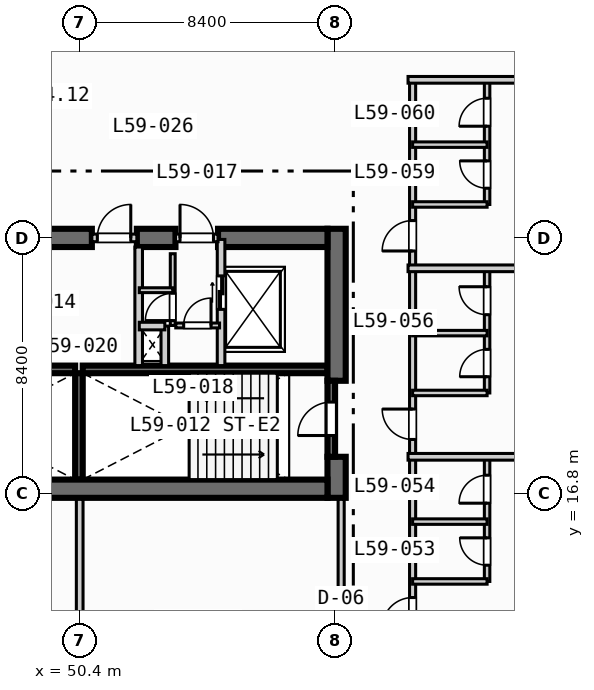
"""IFC4 building model, lengths in metres.
Left out: names, types, materials, properties, quantities, classifications, styles, units other than length and angle.
Written with IfcOpenShell. Run it as: python <this file> out.ifc"""

import sys

from ifc_helpers import new_model, si_unit, direction, frame, frame_2d, origin, place, context, subcontext, project, spatial, rectangle, extrude, element, fill, save


model = new_model("IFC4")
c1 = context("Model", 3, precision=1e-05, world=origin(), true_north=direction((0.0, 1.0)))
c2 = subcontext(c1, "Body", "Model", "MODEL_VIEW")
j1 = project(units=[si_unit("LENGTHUNIT", "METRE"), si_unit("PLANEANGLEUNIT", "RADIAN")], contexts=[c1])
p1 = place(None, origin())
s1 = spatial("IfcSite", under=j1, at=p1, CompositionType="ELEMENT")
p2 = place(p1, origin())
s2 = spatial("IfcBuilding", under=s1, at=p2, CompositionType="ELEMENT")
p3 = place(p2, frame((0.0, 0.0, 241.6)))
s3 = spatial("IfcBuildingStorey", under=s2, at=p3, CompositionType="ELEMENT", Elevation=241.6)
for number, where, z_axis, x_axis in (
    (1, (42.2, 20.875, 0.0), (0.0, 0.0, 1.0), (1.0, 0.0, 0.0)),
    (2, (50.5, 20.875, 0.0), (0.0, 0.0, 1.0), (1.0, 0.0, 0.0)),
):
    element("IfcWall", number, at=place(p3, frame(where, z_axis=z_axis, x_axis=x_axis)), inside=s3, PredefinedType="SOLIDWALL", context=c2, shape_type="SweptSolid", body=[
        extrude(rectangle(XDim=8.05, YDim=0.25, at=frame_2d((4.025, 0.0))), origin(), (0.0, 0.0, 1.0), 3.47),
    ])
p4 = place(p3, frame((50.375, 17.25, 0.0), z_axis=(0.0, 0.0, 1.0), x_axis=(0.0, 1.0, 0.0)))
e3 = element("IfcWall", 3, at=p4, inside=s3, PredefinedType="SOLIDWALL", context=c2, shape_type="SweptSolid", body=[
    extrude(rectangle(XDim=3.5, YDim=0.25, at=frame_2d((1.75, 0.0))), origin(), (0.0, 0.0, 1.0), 3.47),
])
p5 = place(p3, frame((58.85, 16.65, 0.0), z_axis=(0.0, 0.0, 1.0), x_axis=(0.0, 1.0, 0.0)))
e4 = element("IfcWall", 4, at=p5, inside=s3, PredefinedType="SHEAR", context=c2, shape_type="SweptSolid", body=[
    extrude(rectangle(XDim=1.35, YDim=0.6, at=frame_2d((0.675, 0.0))), origin(), (0.0, 0.0, 1.0), 3.47),
])
p6 = place(p3, frame((58.85, 20.5, 0.0), z_axis=(0.0, 0.0, 1.0), x_axis=(0.0, 1.0, 0.0)))
e5 = element("IfcWall", 5, at=p6, inside=s3, PredefinedType="SHEAR", context=c2, shape_type="SweptSolid", body=[
    extrude(rectangle(XDim=5.0, YDim=0.6, at=frame_2d((2.5, 0.0))), origin(), (0.0, 0.0, 1.0), 3.47),
])
p7 = place(p3, frame((42.2, 16.95, 0.0), z_axis=(0.0, 0.0, 1.0), x_axis=(1.0, 0.0, 0.0)))
e6 = element("IfcWall", 6, at=p7, inside=s3, PredefinedType="SHEAR", context=c2, shape_type="SweptSolid", body=[
    extrude(rectangle(XDim=16.35, YDim=0.6, at=frame_2d((8.175, 0.0))), origin(), (0.0, 0.0, 1.0), 3.47),
])
p8 = place(p3, frame((42.2, 25.2, 0.0), z_axis=(0.0, 0.0, 1.0), x_axis=(1.0, 0.0, 0.0)))
e7 = element("IfcWall", 7, at=p8, inside=s3, PredefinedType="SHEAR", context=c2, shape_type="SweptSolid", body=[
    extrude(rectangle(XDim=8.6, YDim=0.6, at=frame_2d((4.3, 0.0))), origin(), (0.0, 0.0, 1.0), 3.47),
])
p9 = place(p3, frame((52.28, 25.2, 0.0), z_axis=(0.0, 0.0, 1.0), x_axis=(1.0, 0.0, 0.0)))
e8 = element("IfcWall", 8, at=p9, inside=s3, PredefinedType="SHEAR", context=c2, shape_type="SweptSolid", body=[
    extrude(rectangle(XDim=1.27, YDim=0.6, at=frame_2d((0.635, 0.0))), origin(), (0.0, 0.0, 1.0), 3.47),
])
p10 = place(p3, frame((54.95, 25.2, 0.0), z_axis=(0.0, 0.0, 1.0), x_axis=(1.0, 0.0, 0.0)))
e9 = element("IfcWall", 9, at=p10, inside=s3, PredefinedType="SHEAR", context=c2, shape_type="SweptSolid", body=[
    extrude(rectangle(XDim=3.6, YDim=0.6, at=frame_2d((1.8, 0.0))), origin(), (0.0, 0.0, 1.0), 3.47),
])
p11 = place(p3, frame((58.675, 18.0, 0.0), z_axis=(0.0, 0.0, 1.0), x_axis=(0.0, 1.0, 0.0)))
e10 = element("IfcWall", 10, at=p11, inside=s3, PredefinedType="SOLIDWALL", context=c2, shape_type="SweptSolid", body=[
    extrude(rectangle(XDim=2.5, YDim=0.25, at=frame_2d((1.25, 0.0))), origin(), (0.0, 0.0, 1.0), 3.47),
])
p12 = place(p11, frame((0.7, 0.0, 0.0)))
e11 = element("IfcOpeningElement", 11, at=p12, cuts=e10, PredefinedType="OPENING", context=c2, shape_type="SweptSolid", body=[
    extrude(rectangle(XDim=1.1, YDim=2.15, at=frame_2d((0.55, 1.075))), frame((0.0, 0.135, 0.0), z_axis=(0.0, -1.0, 0.0), x_axis=(1.0, 0.0, 0.0)), (0.0, 0.0, 1.0), 0.27),
])
p13 = place(p3, frame((50.8, 25.2, 0.0), z_axis=(0.0, 0.0, 1.0), x_axis=(1.0, 0.0, 0.0)))
e12 = element("IfcWall", 12, at=p13, inside=s3, PredefinedType="SOLIDWALL", context=c2, shape_type="SweptSolid", body=[
    extrude(rectangle(XDim=1.48, YDim=0.25, at=frame_2d((0.74, 0.0))), origin(), (0.0, 0.0, 1.0), 3.47),
])
p14 = place(p13, frame((0.18, 0.0, 0.0)))
e13 = element("IfcOpeningElement", 13, at=p14, cuts=e12, PredefinedType="OPENING", context=c2, shape_type="SweptSolid", body=[
    extrude(rectangle(XDim=1.1, YDim=2.15, at=frame_2d((0.55, 1.075))), frame((0.0, 0.135, 0.0), z_axis=(0.0, -1.0, 0.0), x_axis=(1.0, 0.0, 0.0)), (0.0, 0.0, 1.0), 0.27),
])
p15 = place(p3, frame((52.34, 21.0, 0.0), z_axis=(0.0, 0.0, 1.0), x_axis=(0.0, 1.0, 0.0)))
e14 = element("IfcWall", 14, at=p15, inside=s3, PredefinedType="SOLIDWALL", context=c2, shape_type="SweptSolid", body=[
    extrude(rectangle(XDim=3.9, YDim=0.25, at=frame_2d((1.95, 0.0))), origin(), (0.0, 0.0, 1.0), 3.47),
])
p16 = place(p3, frame((55.05, 21.0, 0.0), z_axis=(0.0, 0.0, 1.0), x_axis=(0.0, 1.0, 0.0)))
e15 = element("IfcWall", 15, at=p16, inside=s3, PredefinedType="SOLIDWALL", context=c2, shape_type="SweptSolid", body=[
    extrude(rectangle(XDim=4.15, YDim=0.25, at=frame_2d((2.075, 0.0))), origin(), (0.0, 0.0, 1.0), 3.47),
])
p17 = place(p16, frame((1.85, 0.0, 0.0)))
e16 = element("IfcOpeningElement", 16, at=p17, cuts=e15, PredefinedType="OPENING", context=c2, shape_type="SweptSolid", body=[
    extrude(rectangle(XDim=1.1, YDim=2.15, at=frame_2d((0.55, 1.075))), frame((0.0, 0.135, 0.0), z_axis=(0.0, -1.0, 0.0), x_axis=(1.0, 0.0, 0.0)), (0.0, 0.0, 1.0), 0.27),
])
p18 = place(p3, frame((53.55, 25.2, 0.0), z_axis=(0.0, 0.0, 1.0), x_axis=(1.0, 0.0, 0.0)))
e17 = element("IfcWall", 17, at=p18, inside=s3, PredefinedType="SOLIDWALL", context=c2, shape_type="SweptSolid", body=[
    extrude(rectangle(XDim=1.4, YDim=0.25, at=frame_2d((0.7, 0.0))), origin(), (0.0, 0.0, 1.0), 3.47),
])
p19 = place(p18, frame((0.15, 0.0, 0.0)))
e18 = element("IfcOpeningElement", 18, at=p19, cuts=e17, PredefinedType="OPENING", context=c2, shape_type="SweptSolid", body=[
    extrude(rectangle(XDim=1.1, YDim=2.15, at=frame_2d((0.55, 1.075))), frame((0.0, 0.135, 0.0), z_axis=(0.0, -1.0, 0.0), x_axis=(1.0, 0.0, 0.0)), (0.0, 0.0, 1.0), 0.27),
])
p20 = place(p3, frame((53.2, 21.0, 0.0), z_axis=(0.0, 0.0, 1.0), x_axis=(0.0, 1.0, 0.0)))
e19 = element("IfcWall", 19, at=p20, inside=s3, PredefinedType="SOLIDWALL", context=c2, shape_type="SweptSolid", body=[
    extrude(rectangle(XDim=1.3, YDim=0.25, at=frame_2d((0.65, 0.0))), origin(), (0.0, 0.0, 1.0), 3.47),
])
p21 = place(p3, frame((52.36, 22.3, 0.0), z_axis=(0.0, 0.0, 1.0), x_axis=(1.0, 0.0, 0.0)))
e20 = element("IfcWall", 20, at=p21, inside=s3, PredefinedType="SOLIDWALL", context=c2, shape_type="SweptSolid", body=[
    extrude(rectangle(XDim=0.84, YDim=0.25, at=frame_2d((0.42, 0.0))), origin(), (0.0, 0.0, 1.0), 3.47),
])
p22 = place(p3, frame((53.56, 22.32, 0.0), z_axis=(0.0, 0.0, 1.0), x_axis=(1.0, 0.0, 0.0)))
e21 = element("IfcWall", 21, at=p22, inside=s3, PredefinedType="PARTITIONING", context=c2, shape_type="SweptSolid", body=[
    extrude(rectangle(XDim=1.44, YDim=0.16, at=frame_2d((0.72, 0.0))), origin(), (0.0, 0.0, 1.0), 3.47),
])
p23 = place(p22, frame((0.26, 0.0, 0.0)))
e22 = element("IfcOpeningElement", 22, at=p23, cuts=e21, PredefinedType="OPENING", context=c2, shape_type="SweptSolid", body=[
    extrude(rectangle(XDim=0.9, YDim=2.1, at=frame_2d((0.45, 1.05))), frame((0.0, 0.09, 0.0), z_axis=(0.0, -1.0, 0.0), x_axis=(1.0, 0.0, 0.0)), (0.0, 0.0, 1.0), 0.18),
])
p24 = place(p3, frame((53.46, 22.32, 0.0), z_axis=(0.0, 0.0, 1.0), x_axis=(0.0, 1.0, 0.0)))
e23 = element("IfcWall", 23, at=p24, inside=s3, PredefinedType="PARTITIONING", context=c2, shape_type="SweptSolid", body=[
    extrude(rectangle(XDim=2.36, YDim=0.16, at=frame_2d((1.18, 0.0))), origin(), (0.0, 0.0, 1.0), 3.47),
])
p25 = place(p24, frame((0.16, 0.0, 0.0)))
e24 = element("IfcOpeningElement", 24, at=p25, cuts=e23, PredefinedType="OPENING", context=c2, shape_type="SweptSolid", body=[
    extrude(rectangle(XDim=0.9, YDim=2.1, at=frame_2d((0.45, 1.05))), frame((0.0, 0.09, 0.0), z_axis=(0.0, -1.0, 0.0), x_axis=(1.0, 0.0, 0.0)), (0.0, 0.0, 1.0), 0.18),
])
p26 = place(p3, frame((52.36, 23.48, 0.0), z_axis=(0.0, 0.0, 1.0), x_axis=(1.0, 0.0, 0.0)))
e25 = element("IfcWall", 25, at=p26, inside=s3, PredefinedType="PARTITIONING", context=c2, shape_type="SweptSolid", body=[
    extrude(rectangle(XDim=1.1, YDim=0.16, at=frame_2d((0.55, 0.0))), origin(), (0.0, 0.0, 1.0), 3.47),
])
p27 = place(p3, frame((59.0, 8.65, 0.0), z_axis=(0.0, 0.0, 1.0), x_axis=(0.0, 1.0, 0.0)))
e26 = element("IfcWall", 26, at=p27, inside=s3, PredefinedType="PARTITIONING", context=c2, shape_type="SweptSolid", body=[
    extrude(rectangle(XDim=7.95, YDim=0.2, at=frame_2d((3.975, 0.0))), origin(), (0.0, 0.0, 1.0), 2.82),
])
p28 = place(p27, frame((2.2, 0.0, 0.0)))
e27 = element("IfcOpeningElement", 27, at=p28, cuts=e26, PredefinedType="OPENING", context=c2, shape_type="SweptSolid", body=[
    extrude(rectangle(XDim=0.92, YDim=2.1, at=frame_2d((0.46, 1.05))), frame((0.0, 0.11, 0.0), z_axis=(0.0, -1.0, 0.0), x_axis=(1.0, 0.0, 0.0)), (0.0, 0.0, 1.0), 0.22),
])
p29 = place(p3, frame((50.4, 8.65, 0.0), z_axis=(0.0, 0.0, 1.0), x_axis=(0.0, 1.0, 0.0)))
e28 = element("IfcWall", 28, at=p29, inside=s3, PredefinedType="PARTITIONING", context=c2, shape_type="SweptSolid", body=[
    extrude(rectangle(XDim=7.95, YDim=0.22, at=frame_2d((3.975, 0.0))), origin(), (0.0, 0.0, 1.0), 2.853),
])
p30 = place(p3, frame((61.35, 11.8, 0.0), z_axis=(0.0, 0.0, 1.0), x_axis=(0.0, 1.0, 0.0)))
e29 = element("IfcWall", 29, at=p30, inside=s3, PredefinedType="PARTITIONING", context=c2, shape_type="SweptSolid", body=[
    extrude(rectangle(XDim=18.6, YDim=0.2, at=frame_2d((9.3, 0.0))), origin(), (0.0, 0.0, 1.0), 3.47),
])
p31 = place(p30, frame((0.57, 0.0, 0.0)))
e30 = element("IfcOpeningElement", 30, at=p31, cuts=e29, PredefinedType="OPENING", context=c2, shape_type="SweptSolid", body=[
    extrude(rectangle(XDim=1.0, YDim=2.15, at=frame_2d((0.5, 1.075))), frame((0.0, 0.11, 0.0), z_axis=(0.0, -1.0, 0.0), x_axis=(1.0, 0.0, 0.0)), (0.0, 0.0, 1.0), 0.22),
])
p32 = place(p30, frame((6.77, 0.0, 0.0)))
e31 = element("IfcOpeningElement", 31, at=p32, cuts=e29, PredefinedType="OPENING", context=c2, shape_type="SweptSolid", body=[
    extrude(rectangle(XDim=1.0, YDim=2.15, at=frame_2d((0.5, 1.075))), frame((0.0, 0.11, 0.0), z_axis=(0.0, -1.0, 0.0), x_axis=(1.0, 0.0, 0.0)), (0.0, 0.0, 1.0), 0.22),
])
p33 = place(p30, frame((12.97, 0.0, 0.0)))
e32 = element("IfcOpeningElement", 32, at=p33, cuts=e29, PredefinedType="OPENING", context=c2, shape_type="SweptSolid", body=[
    extrude(rectangle(XDim=1.0, YDim=2.15, at=frame_2d((0.5, 1.075))), frame((0.0, 0.11, 0.0), z_axis=(0.0, -1.0, 0.0), x_axis=(1.0, 0.0, 0.0)), (0.0, 0.0, 1.0), 0.22),
])
p34 = place(p3, frame((63.8, 13.9, 0.0), z_axis=(0.0, 0.0, 1.0), x_axis=(0.0, 1.0, 0.0)))
e33 = element("IfcWall", 33, at=p34, inside=s3, PredefinedType="PLUMBINGWALL", context=c2, shape_type="SweptSolid", body=[
    extrude(rectangle(XDim=4.1, YDim=0.18, at=frame_2d((2.05, 0.0))), origin(), (0.0, 0.0, 1.0), 3.47),
])
p35 = place(p34, frame((0.534, 0.0, 0.0)))
e34 = element("IfcOpeningElement", 34, at=p35, cuts=e33, PredefinedType="OPENING", context=c2, shape_type="SweptSolid", body=[
    extrude(rectangle(XDim=0.9, YDim=2.1, at=frame_2d((0.45, 1.05))), frame((0.0, 0.1, 0.0), z_axis=(0.0, -1.0, 0.0), x_axis=(1.0, 0.0, 0.0)), (0.0, 0.0, 1.0), 0.2),
])
p36 = place(p34, frame((2.574, 0.0, 0.0)))
e35 = element("IfcOpeningElement", 35, at=p36, cuts=e33, PredefinedType="OPENING", context=c2, shape_type="SweptSolid", body=[
    extrude(rectangle(XDim=0.92, YDim=2.1, at=frame_2d((0.46, 1.05))), frame((0.0, 0.1, 0.0), z_axis=(0.0, -1.0, 0.0), x_axis=(1.0, 0.0, 0.0)), (0.0, 0.0, 1.0), 0.2),
])
for number, where, z_axis, x_axis in (
    (36, (61.35, 13.9, 0.0), (0.0, 0.0, 1.0), (1.0, 0.0, 0.0)),
    (37, (61.35, 15.868, 0.0), (0.0, 0.0, 1.0), (1.0, 0.0, 0.0)),
):
    element("IfcWall", number, at=place(p3, frame(where, z_axis=z_axis, x_axis=x_axis)), inside=s3, PredefinedType="PLUMBINGWALL", context=c2, shape_type="SweptSolid", body=[
        extrude(rectangle(XDim=2.45, YDim=0.18, at=frame_2d((1.225, 0.0))), origin(), (0.0, 0.0, 1.0), 3.47),
    ])
p37 = place(p3, frame((61.2, 18.0, 0.0), z_axis=(0.0, 0.0, 1.0), x_axis=(1.0, 0.0, 0.0)))
e38 = element("IfcWall", 38, at=p37, inside=s3, PredefinedType="PARTITIONING", context=c2, shape_type="SweptSolid", body=[
    extrude(rectangle(XDim=14.2, YDim=0.22, at=frame_2d((7.1, 0.0))), origin(), (0.0, 0.0, 1.0), 3.47),
])
p38 = place(p3, frame((63.8, 20.1, 0.0), z_axis=(0.0, 0.0, 1.0), x_axis=(0.0, 1.0, 0.0)))
e39 = element("IfcWall", 39, at=p38, inside=s3, PredefinedType="PLUMBINGWALL", context=c2, shape_type="SweptSolid", body=[
    extrude(rectangle(XDim=4.1, YDim=0.18, at=frame_2d((2.05, 0.0))), origin(), (0.0, 0.0, 1.0), 3.47),
])
p39 = place(p38, frame((0.534, 0.0, 0.0)))
e40 = element("IfcOpeningElement", 40, at=p39, cuts=e39, PredefinedType="OPENING", context=c2, shape_type="SweptSolid", body=[
    extrude(rectangle(XDim=0.9, YDim=2.1, at=frame_2d((0.45, 1.05))), frame((0.0, 0.1, 0.0), z_axis=(0.0, -1.0, 0.0), x_axis=(1.0, 0.0, 0.0)), (0.0, 0.0, 1.0), 0.2),
])
p40 = place(p38, frame((2.574, 0.0, 0.0)))
e41 = element("IfcOpeningElement", 41, at=p40, cuts=e39, PredefinedType="OPENING", context=c2, shape_type="SweptSolid", body=[
    extrude(rectangle(XDim=0.92, YDim=2.1, at=frame_2d((0.46, 1.05))), frame((0.0, 0.1, 0.0), z_axis=(0.0, -1.0, 0.0), x_axis=(1.0, 0.0, 0.0)), (0.0, 0.0, 1.0), 0.2),
])
for number, where, z_axis, x_axis in (
    (42, (61.35, 20.1, 0.0), (0.0, 0.0, 1.0), (1.0, 0.0, 0.0)),
    (43, (61.35, 22.068, 0.0), (0.0, 0.0, 1.0), (1.0, 0.0, 0.0)),
):
    element("IfcWall", number, at=place(p3, frame(where, z_axis=z_axis, x_axis=x_axis)), inside=s3, PredefinedType="PLUMBINGWALL", context=c2, shape_type="SweptSolid", body=[
        extrude(rectangle(XDim=2.45, YDim=0.18, at=frame_2d((1.225, 0.0))), origin(), (0.0, 0.0, 1.0), 3.47),
    ])
p41 = place(p3, frame((61.2, 24.2, 0.0), z_axis=(0.0, 0.0, 1.0), x_axis=(1.0, 0.0, 0.0)))
e44 = element("IfcWall", 44, at=p41, inside=s3, PredefinedType="PARTITIONING", context=c2, shape_type="SweptSolid", body=[
    extrude(rectangle(XDim=14.2, YDim=0.22, at=frame_2d((7.1, 0.0))), origin(), (0.0, 0.0, 1.0), 3.47),
])
p42 = place(p3, frame((63.8, 26.3, 0.0), z_axis=(0.0, 0.0, 1.0), x_axis=(0.0, 1.0, 0.0)))
e45 = element("IfcWall", 45, at=p42, inside=s3, PredefinedType="PLUMBINGWALL", context=c2, shape_type="SweptSolid", body=[
    extrude(rectangle(XDim=4.1, YDim=0.18, at=frame_2d((2.05, 0.0))), origin(), (0.0, 0.0, 1.0), 3.47),
])
p43 = place(p42, frame((0.534, 0.0, 0.0)))
e46 = element("IfcOpeningElement", 46, at=p43, cuts=e45, PredefinedType="OPENING", context=c2, shape_type="SweptSolid", body=[
    extrude(rectangle(XDim=0.9, YDim=2.1, at=frame_2d((0.45, 1.05))), frame((0.0, 0.1, 0.0), z_axis=(0.0, -1.0, 0.0), x_axis=(1.0, 0.0, 0.0)), (0.0, 0.0, 1.0), 0.2),
])
p44 = place(p42, frame((2.574, 0.0, 0.0)))
e47 = element("IfcOpeningElement", 47, at=p44, cuts=e45, PredefinedType="OPENING", context=c2, shape_type="SweptSolid", body=[
    extrude(rectangle(XDim=0.92, YDim=2.1, at=frame_2d((0.46, 1.05))), frame((0.0, 0.1, 0.0), z_axis=(0.0, -1.0, 0.0), x_axis=(1.0, 0.0, 0.0)), (0.0, 0.0, 1.0), 0.2),
])
for number, where, z_axis, x_axis in (
    (48, (61.35, 26.3, 0.0), (0.0, 0.0, 1.0), (1.0, 0.0, 0.0)),
    (49, (61.35, 28.268, 0.0), (0.0, 0.0, 1.0), (1.0, 0.0, 0.0)),
):
    element("IfcWall", number, at=place(p3, frame(where, z_axis=z_axis, x_axis=x_axis)), inside=s3, PredefinedType="PLUMBINGWALL", context=c2, shape_type="SweptSolid", body=[
        extrude(rectangle(XDim=2.45, YDim=0.18, at=frame_2d((1.225, 0.0))), origin(), (0.0, 0.0, 1.0), 3.47),
    ])
p45 = place(p3, frame((61.2, 30.4, 0.0), z_axis=(0.0, 0.0, 1.0), x_axis=(1.0, 0.0, 0.0)))
e50 = element("IfcWall", 50, at=p45, inside=s3, PredefinedType="PARTITIONING", context=c2, shape_type="SweptSolid", body=[
    extrude(rectangle(XDim=10.98, YDim=0.22, at=frame_2d((5.49, 0.0))), origin(), (0.0, 0.0, 1.0), 3.47),
])
p46 = place(p12, origin())
e51 = element("IfcDoor", 51, at=p46, inside=s3, OperationType="SINGLE_SWING_LEFT", PredefinedType="DOOR", context=c2, shape_type="SweptSolid", body=[
    extrude(rectangle(XDim=1.1, YDim=2.15, at=frame_2d((0.55, 1.075))), frame((0.0, 0.025, 0.0), z_axis=(0.0, -1.0, 0.0), x_axis=(1.0, 0.0, 0.0)), (0.0, 0.0, 1.0), 0.05),
])
fill(e11, e51)
p47 = place(p14, origin())
e52 = element("IfcDoor", 52, at=p47, inside=s3, OperationType="SINGLE_SWING_RIGHT", PredefinedType="DOOR", context=c2, shape_type="SweptSolid", body=[
    extrude(rectangle(XDim=1.1, YDim=2.15, at=frame_2d((0.55, 1.075))), frame((0.0, 0.025, 0.0), z_axis=(0.0, -1.0, 0.0), x_axis=(1.0, 0.0, 0.0)), (0.0, 0.0, 1.0), 0.05),
])
fill(e13, e52)
p48 = place(p17, origin())
e53 = element("IfcDoor", 53, at=p48, inside=s3, OperationType="SLIDING_TO_LEFT", PredefinedType="DOOR", context=c2, shape_type="SweptSolid", body=[
    extrude(rectangle(XDim=1.1, YDim=2.15, at=frame_2d((0.55, 1.075))), frame((0.0, 0.025, 0.0), z_axis=(0.0, -1.0, 0.0), x_axis=(1.0, 0.0, 0.0)), (0.0, 0.0, 1.0), 0.05),
])
fill(e16, e53)
p49 = place(p19, origin())
e54 = element("IfcDoor", 54, at=p49, inside=s3, OperationType="SINGLE_SWING_LEFT", PredefinedType="DOOR", context=c2, shape_type="SweptSolid", body=[
    extrude(rectangle(XDim=1.1, YDim=2.15, at=frame_2d((0.55, 1.075))), frame((0.0, 0.025, 0.0), z_axis=(0.0, -1.0, 0.0), x_axis=(1.0, 0.0, 0.0)), (0.0, 0.0, 1.0), 0.05),
])
fill(e18, e54)
p50 = place(p23, origin())
e55 = element("IfcDoor", 55, at=p50, inside=s3, OperationType="SINGLE_SWING_RIGHT", PredefinedType="DOOR", context=c2, shape_type="SweptSolid", body=[
    extrude(rectangle(XDim=0.9, YDim=2.1, at=frame_2d((0.45, 1.05))), frame((0.0, 0.025, 0.0), z_axis=(0.0, -1.0, 0.0), x_axis=(1.0, 0.0, 0.0)), (0.0, 0.0, 1.0), 0.05),
])
fill(e22, e55)
p51 = place(p25, origin())
e56 = element("IfcDoor", 56, at=p51, inside=s3, OperationType="SINGLE_SWING_LEFT", PredefinedType="DOOR", context=c2, shape_type="SweptSolid", body=[
    extrude(rectangle(XDim=0.9, YDim=2.1, at=frame_2d((0.45, 1.05))), frame((0.0, 0.025, 0.0), z_axis=(0.0, -1.0, 0.0), x_axis=(1.0, 0.0, 0.0)), (0.0, 0.0, 1.0), 0.05),
])
fill(e24, e56)
p52 = place(p31, origin())
e57 = element("IfcDoor", 57, at=p52, inside=s3, OperationType="SINGLE_SWING_LEFT", PredefinedType="DOOR", context=c2, shape_type="SweptSolid", body=[
    extrude(rectangle(XDim=1.0, YDim=2.15, at=frame_2d((0.5, 1.075))), frame((0.0, 0.025, 0.0), z_axis=(0.0, -1.0, 0.0), x_axis=(1.0, 0.0, 0.0)), (0.0, 0.0, 1.0), 0.05),
])
fill(e30, e57)
p53 = place(p32, origin())
e58 = element("IfcDoor", 58, at=p53, inside=s3, OperationType="SINGLE_SWING_RIGHT", PredefinedType="DOOR", context=c2, shape_type="SweptSolid", body=[
    extrude(rectangle(XDim=1.0, YDim=2.15, at=frame_2d((0.5, 1.075))), frame((0.0, 0.025, 0.0), z_axis=(0.0, -1.0, 0.0), x_axis=(1.0, 0.0, 0.0)), (0.0, 0.0, 1.0), 0.05),
])
fill(e31, e58)
p54 = place(p33, origin())
e59 = element("IfcDoor", 59, at=p54, inside=s3, OperationType="SINGLE_SWING_LEFT", PredefinedType="DOOR", context=c2, shape_type="SweptSolid", body=[
    extrude(rectangle(XDim=1.0, YDim=2.15, at=frame_2d((0.5, 1.075))), frame((0.0, 0.025, 0.0), z_axis=(0.0, -1.0, 0.0), x_axis=(1.0, 0.0, 0.0)), (0.0, 0.0, 1.0), 0.05),
])
fill(e32, e59)
p55 = place(p35, origin())
e60 = element("IfcDoor", 60, at=p55, inside=s3, OperationType="SINGLE_SWING_RIGHT", PredefinedType="DOOR", context=c2, shape_type="SweptSolid", body=[
    extrude(rectangle(XDim=0.9, YDim=2.1, at=frame_2d((0.45, 1.05))), frame((0.0, 0.025, 0.0), z_axis=(0.0, -1.0, 0.0), x_axis=(1.0, 0.0, 0.0)), (0.0, 0.0, 1.0), 0.05),
])
fill(e34, e60)
p56 = place(p36, origin())
e61 = element("IfcDoor", 61, at=p56, inside=s3, OperationType="SINGLE_SWING_LEFT", PredefinedType="DOOR", context=c2, shape_type="SweptSolid", body=[
    extrude(rectangle(XDim=0.92, YDim=2.1, at=frame_2d((0.46, 1.05))), frame((0.0, 0.025, 0.0), z_axis=(0.0, -1.0, 0.0), x_axis=(1.0, 0.0, 0.0)), (0.0, 0.0, 1.0), 0.05),
])
fill(e35, e61)
p57 = place(p39, origin())
e62 = element("IfcDoor", 62, at=p57, inside=s3, OperationType="SINGLE_SWING_LEFT", PredefinedType="DOOR", context=c2, shape_type="SweptSolid", body=[
    extrude(rectangle(XDim=0.9, YDim=2.1, at=frame_2d((0.45, 1.05))), frame((0.0, 0.025, 0.0), z_axis=(0.0, -1.0, 0.0), x_axis=(1.0, 0.0, 0.0)), (0.0, 0.0, 1.0), 0.05),
])
fill(e40, e62)
p58 = place(p40, origin())
e63 = element("IfcDoor", 63, at=p58, inside=s3, OperationType="SINGLE_SWING_RIGHT", PredefinedType="DOOR", context=c2, shape_type="SweptSolid", body=[
    extrude(rectangle(XDim=0.92, YDim=2.1, at=frame_2d((0.46, 1.05))), frame((0.0, 0.025, 0.0), z_axis=(0.0, -1.0, 0.0), x_axis=(1.0, 0.0, 0.0)), (0.0, 0.0, 1.0), 0.05),
])
fill(e41, e63)
p59 = place(p43, origin())
e64 = element("IfcDoor", 64, at=p59, inside=s3, OperationType="SINGLE_SWING_RIGHT", PredefinedType="DOOR", context=c2, shape_type="SweptSolid", body=[
    extrude(rectangle(XDim=0.9, YDim=2.1, at=frame_2d((0.45, 1.05))), frame((0.0, 0.025, 0.0), z_axis=(0.0, -1.0, 0.0), x_axis=(1.0, 0.0, 0.0)), (0.0, 0.0, 1.0), 0.05),
])
fill(e46, e64)
p60 = place(p44, origin())
e65 = element("IfcDoor", 65, at=p60, inside=s3, OperationType="SINGLE_SWING_LEFT", PredefinedType="DOOR", context=c2, shape_type="SweptSolid", body=[
    extrude(rectangle(XDim=0.92, YDim=2.1, at=frame_2d((0.46, 1.05))), frame((0.0, 0.025, 0.0), z_axis=(0.0, -1.0, 0.0), x_axis=(1.0, 0.0, 0.0)), (0.0, 0.0, 1.0), 0.05),
])
fill(e47, e65)
save(model, sys.argv[1])
